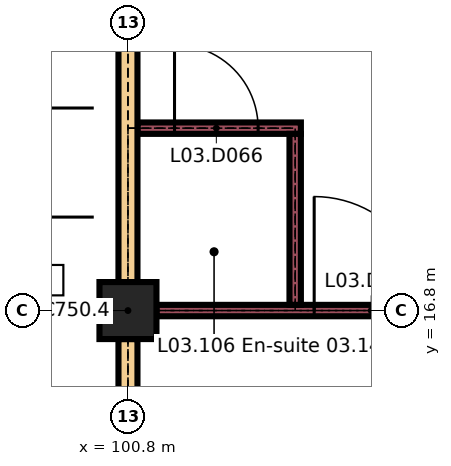
"""IFC4 building model, lengths in metres.
Left out: names, types, materials, properties, quantities, classifications, styles, units other than length and angle.
Written with IfcOpenShell. Run it as: python <this file> out.ifc"""

import sys

from ifc_helpers import new_model, si_unit, direction, frame, frame_2d, origin, origin_2d, place, context, subcontext, project, spatial, rectangle, extrude, element, fill, save


model = new_model("IFC4")
c1 = context("Model", 3, precision=1e-05, world=origin(), true_north=direction((0.0, 1.0)))
c2 = subcontext(c1, "Body", "Model", "MODEL_VIEW")
j1 = project(units=[si_unit("LENGTHUNIT", "METRE"), si_unit("PLANEANGLEUNIT", "RADIAN")], contexts=[c1])
p1 = place(None, origin())
s1 = spatial("IfcSite", under=j1, at=p1, CompositionType="ELEMENT")
p2 = place(p1, origin())
s2 = spatial("IfcBuilding", under=s1, at=p2, CompositionType="ELEMENT")
p3 = place(p2, frame((0.0, 0.0, 15.3)))
s3 = spatial("IfcBuildingStorey", under=s2, at=p3, CompositionType="ELEMENT", Elevation=15.3)
p4 = place(p3, frame((100.8, 16.8, 0.0), z_axis=(0.0, 0.0, 1.0), x_axis=(1.0, 0.0, 0.0)))
e1 = element("IfcColumn", 1, at=p4, inside=s3, PredefinedType="COLUMN", context=c2, shape_type="SweptSolid", body=[
    extrude(rectangle(XDim=0.75, YDim=0.75, at=origin_2d()), origin(), (0.0, 0.0, 1.0), 3.26),
])
p5 = place(p3, frame((42.0, 16.8, 4.904), z_axis=(0.0, 0.0, 1.0), x_axis=(1.0, 0.0, 0.0)))
e2 = element("IfcWall", 2, at=p5, inside=s3, PredefinedType="SOLIDWALL", context=c2, shape_type="SweptSolid", body=[
    extrude(rectangle(XDim=58.8, YDim=0.2, at=frame_2d((29.4, 0.0))), origin(), (0.0, 0.0, 1.0), 2.539),
])
p6 = place(p5, frame((1.05, 0.0, 0.3)))
e3 = element("IfcOpeningElement", 3, at=p6, cuts=e2, PredefinedType="OPENING", context=c2, shape_type="SweptSolid", body=[
    extrude(rectangle(XDim=2.1, YDim=1.8, at=frame_2d((1.05, 0.9))), frame((0.0, 0.11, 0.0), z_axis=(0.0, -1.0, 0.0), x_axis=(1.0, 0.0, 0.0)), (0.0, 0.0, 1.0), 0.22),
])
p7 = place(p5, frame((5.25, 0.0, 0.3)))
e4 = element("IfcOpeningElement", 4, at=p7, cuts=e2, PredefinedType="OPENING", context=c2, shape_type="SweptSolid", body=[
    extrude(rectangle(XDim=2.1, YDim=1.8, at=frame_2d((1.05, 0.9))), frame((0.0, 0.11, 0.0), z_axis=(0.0, -1.0, 0.0), x_axis=(1.0, 0.0, 0.0)), (0.0, 0.0, 1.0), 0.22),
])
p8 = place(p5, frame((9.45, 0.0, 0.3)))
e5 = element("IfcOpeningElement", 5, at=p8, cuts=e2, PredefinedType="OPENING", context=c2, shape_type="SweptSolid", body=[
    extrude(rectangle(XDim=2.1, YDim=1.8, at=frame_2d((1.05, 0.9))), frame((0.0, 0.11, 0.0), z_axis=(0.0, -1.0, 0.0), x_axis=(1.0, 0.0, 0.0)), (0.0, 0.0, 1.0), 0.22),
])
p9 = place(p5, frame((13.65, 0.0, 0.3)))
e6 = element("IfcOpeningElement", 6, at=p9, cuts=e2, PredefinedType="OPENING", context=c2, shape_type="SweptSolid", body=[
    extrude(rectangle(XDim=2.1, YDim=1.8, at=frame_2d((1.05, 0.9))), frame((0.0, 0.11, 0.0), z_axis=(0.0, -1.0, 0.0), x_axis=(1.0, 0.0, 0.0)), (0.0, 0.0, 1.0), 0.22),
])
p10 = place(p5, frame((17.85, 0.0, 0.3)))
e7 = element("IfcOpeningElement", 7, at=p10, cuts=e2, PredefinedType="OPENING", context=c2, shape_type="SweptSolid", body=[
    extrude(rectangle(XDim=2.1, YDim=1.8, at=frame_2d((1.05, 0.9))), frame((0.0, 0.11, 0.0), z_axis=(0.0, -1.0, 0.0), x_axis=(1.0, 0.0, 0.0)), (0.0, 0.0, 1.0), 0.22),
])
p11 = place(p5, frame((22.05, 0.0, 0.3)))
e8 = element("IfcOpeningElement", 8, at=p11, cuts=e2, PredefinedType="OPENING", context=c2, shape_type="SweptSolid", body=[
    extrude(rectangle(XDim=2.1, YDim=1.8, at=frame_2d((1.05, 0.9))), frame((0.0, 0.11, 0.0), z_axis=(0.0, -1.0, 0.0), x_axis=(1.0, 0.0, 0.0)), (0.0, 0.0, 1.0), 0.22),
])
p12 = place(p5, frame((26.25, 0.0, 0.3)))
e9 = element("IfcOpeningElement", 9, at=p12, cuts=e2, PredefinedType="OPENING", context=c2, shape_type="SweptSolid", body=[
    extrude(rectangle(XDim=2.1, YDim=1.8, at=frame_2d((1.05, 0.9))), frame((0.0, 0.11, 0.0), z_axis=(0.0, -1.0, 0.0), x_axis=(1.0, 0.0, 0.0)), (0.0, 0.0, 1.0), 0.22),
])
p13 = place(p5, frame((30.45, 0.0, 0.3)))
e10 = element("IfcOpeningElement", 10, at=p13, cuts=e2, PredefinedType="OPENING", context=c2, shape_type="SweptSolid", body=[
    extrude(rectangle(XDim=2.1, YDim=1.8, at=frame_2d((1.05, 0.9))), frame((0.0, 0.11, 0.0), z_axis=(0.0, -1.0, 0.0), x_axis=(1.0, 0.0, 0.0)), (0.0, 0.0, 1.0), 0.22),
])
p14 = place(p5, frame((34.65, 0.0, 0.3)))
e11 = element("IfcOpeningElement", 11, at=p14, cuts=e2, PredefinedType="OPENING", context=c2, shape_type="SweptSolid", body=[
    extrude(rectangle(XDim=2.1, YDim=1.8, at=frame_2d((1.05, 0.9))), frame((0.0, 0.11, 0.0), z_axis=(0.0, -1.0, 0.0), x_axis=(1.0, 0.0, 0.0)), (0.0, 0.0, 1.0), 0.22),
])
p15 = place(p5, frame((38.85, 0.0, 0.3)))
e12 = element("IfcOpeningElement", 12, at=p15, cuts=e2, PredefinedType="OPENING", context=c2, shape_type="SweptSolid", body=[
    extrude(rectangle(XDim=2.1, YDim=1.8, at=frame_2d((1.05, 0.9))), frame((0.0, 0.11, 0.0), z_axis=(0.0, -1.0, 0.0), x_axis=(1.0, 0.0, 0.0)), (0.0, 0.0, 1.0), 0.22),
])
p16 = place(p5, frame((43.05, 0.0, 0.3)))
e13 = element("IfcOpeningElement", 13, at=p16, cuts=e2, PredefinedType="OPENING", context=c2, shape_type="SweptSolid", body=[
    extrude(rectangle(XDim=2.1, YDim=1.8, at=frame_2d((1.05, 0.9))), frame((0.0, 0.11, 0.0), z_axis=(0.0, -1.0, 0.0), x_axis=(1.0, 0.0, 0.0)), (0.0, 0.0, 1.0), 0.22),
])
p17 = place(p5, frame((47.25, 0.0, 0.3)))
e14 = element("IfcOpeningElement", 14, at=p17, cuts=e2, PredefinedType="OPENING", context=c2, shape_type="SweptSolid", body=[
    extrude(rectangle(XDim=2.1, YDim=1.8, at=frame_2d((1.05, 0.9))), frame((0.0, 0.11, 0.0), z_axis=(0.0, -1.0, 0.0), x_axis=(1.0, 0.0, 0.0)), (0.0, 0.0, 1.0), 0.22),
])
p18 = place(p5, frame((51.45, 0.0, 0.3)))
e15 = element("IfcOpeningElement", 15, at=p18, cuts=e2, PredefinedType="OPENING", context=c2, shape_type="SweptSolid", body=[
    extrude(rectangle(XDim=2.1, YDim=1.8, at=frame_2d((1.05, 0.9))), frame((0.0, 0.11, 0.0), z_axis=(0.0, -1.0, 0.0), x_axis=(1.0, 0.0, 0.0)), (0.0, 0.0, 1.0), 0.22),
])
p19 = place(p5, frame((55.65, 0.0, 0.3)))
e16 = element("IfcOpeningElement", 16, at=p19, cuts=e2, PredefinedType="OPENING", context=c2, shape_type="SweptSolid", body=[
    extrude(rectangle(XDim=2.1, YDim=1.8, at=frame_2d((1.05, 0.9))), frame((0.0, 0.11, 0.0), z_axis=(0.0, -1.0, 0.0), x_axis=(1.0, 0.0, 0.0)), (0.0, 0.0, 1.0), 0.22),
])
p20 = place(p3, frame((101.175, 16.8, 0.0), z_axis=(0.0, 0.0, 1.0), x_axis=(1.0, 0.0, 0.0)))
e17 = element("IfcWall", 17, at=p20, inside=s3, PredefinedType="PARTITIONING", context=c2, shape_type="SweptSolid", body=[
    extrude(rectangle(XDim=7.65, YDim=0.15, at=frame_2d((3.825, 0.0))), origin(), (0.0, 0.0, 1.0), 3.26),
])
p21 = place(p20, frame((2.075, 0.0, 0.0)))
e18 = element("IfcOpeningElement", 18, at=p21, cuts=e17, PredefinedType="OPENING", context=c2, shape_type="SweptSolid", body=[
    extrude(rectangle(XDim=1.5, YDim=2.4, at=frame_2d((0.75, 1.2))), frame((0.0, 0.085, 0.0), z_axis=(0.0, -1.0, 0.0), x_axis=(1.0, 0.0, 0.0)), (0.0, 0.0, 1.0), 0.17),
])
p22 = place(p20, frame((4.075, 0.0, 0.0)))
e19 = element("IfcOpeningElement", 19, at=p22, cuts=e17, PredefinedType="OPENING", context=c2, shape_type="SweptSolid", body=[
    extrude(rectangle(XDim=1.5, YDim=2.4, at=frame_2d((0.75, 1.2))), frame((0.0, 0.085, 0.0), z_axis=(0.0, -1.0, 0.0), x_axis=(1.0, 0.0, 0.0)), (0.0, 0.0, 1.0), 0.17),
])
p23 = place(p3, frame((100.925, 19.2, 0.0), z_axis=(0.0, 0.0, 1.0), x_axis=(1.0, 0.0, 0.0)))
e20 = element("IfcWall", 20, at=p23, inside=s3, PredefinedType="PARTITIONING", context=c2, shape_type="SweptSolid", body=[
    extrude(rectangle(XDim=2.15, YDim=0.15, at=frame_2d((1.075, 0.0))), origin(), (0.0, 0.0, 1.0), 3.26),
])
p24 = place(p23, frame((0.488, 0.0, 0.0)))
e21 = element("IfcOpeningElement", 21, at=p24, cuts=e20, PredefinedType="OPENING", context=c2, shape_type="SweptSolid", body=[
    extrude(rectangle(XDim=1.1, YDim=2.1, at=frame_2d((0.55, 1.05))), frame((0.0, 0.085, 0.0), z_axis=(0.0, -1.0, 0.0), x_axis=(1.0, 0.0, 0.0)), (0.0, 0.0, 1.0), 0.17),
])
p25 = place(p3, frame((100.8, 3.6, 0.0), z_axis=(0.0, 0.0, 1.0), x_axis=(0.0, 1.0, 0.0)))
e22 = element("IfcWall", 22, at=p25, inside=s3, PredefinedType="SOLIDWALL", context=c2, shape_type="SweptSolid", body=[
    extrude(rectangle(XDim=12.825, YDim=0.25, at=frame_2d((6.413, 0.0))), origin(), (0.0, 0.0, 1.0), 3.26),
])
p26 = place(p25, frame((1.5, 0.0, 0.0)))
e23 = element("IfcOpeningElement", 23, at=p26, cuts=e22, PredefinedType="OPENING", context=c2, shape_type="SweptSolid", body=[
    extrude(rectangle(XDim=1.8, YDim=2.4, at=frame_2d((0.9, 1.2))), frame((0.0, 0.135, 0.0), z_axis=(0.0, -1.0, 0.0), x_axis=(1.0, 0.0, 0.0)), (0.0, 0.0, 1.0), 0.27),
])
p27 = place(p3, frame((100.8, 17.175, 0.0), z_axis=(0.0, 0.0, 1.0), x_axis=(0.0, 1.0, 0.0)))
e24 = element("IfcWall", 24, at=p27, inside=s3, PredefinedType="SOLIDWALL", context=c2, shape_type="SweptSolid", body=[
    extrude(rectangle(XDim=7.65, YDim=0.25, at=frame_2d((3.825, 0.0))), origin(), (0.0, 0.0, 1.0), 3.26),
])
p28 = place(p3, frame((103.0, 16.875, 0.0), z_axis=(0.0, 0.0, 1.0), x_axis=(0.0, 1.0, 0.0)))
e25 = element("IfcWall", 25, at=p28, inside=s3, PredefinedType="PARTITIONING", context=c2, shape_type="SweptSolid", body=[
    extrude(rectangle(XDim=2.25, YDim=0.15, at=frame_2d((1.125, 0.0))), origin(), (0.0, 0.0, 1.0), 3.26),
])
p29 = place(p21, origin())
e26 = element("IfcDoor", 26, at=p29, inside=s3, OperationType="SINGLE_SWING_RIGHT", PredefinedType="DOOR", context=c2, shape_type="SweptSolid", body=[
    extrude(rectangle(XDim=1.5, YDim=2.4, at=frame_2d((0.75, 1.2))), frame((0.0, 0.03, 0.0), z_axis=(0.0, -1.0, 0.0), x_axis=(1.0, 0.0, 0.0)), (0.0, 0.0, 1.0), 0.06),
])
fill(e18, e26)
p30 = place(p24, origin())
e27 = element("IfcDoor", 27, at=p30, inside=s3, OperationType="SINGLE_SWING_RIGHT", PredefinedType="DOOR", context=c2, shape_type="SweptSolid", body=[
    extrude(rectangle(XDim=1.1, YDim=2.1, at=frame_2d((0.55, 1.05))), frame((0.0, 0.025, 0.0), z_axis=(0.0, -1.0, 0.0), x_axis=(1.0, 0.0, 0.0)), (0.0, 0.0, 1.0), 0.05),
])
fill(e21, e27)
save(model, sys.argv[1])
